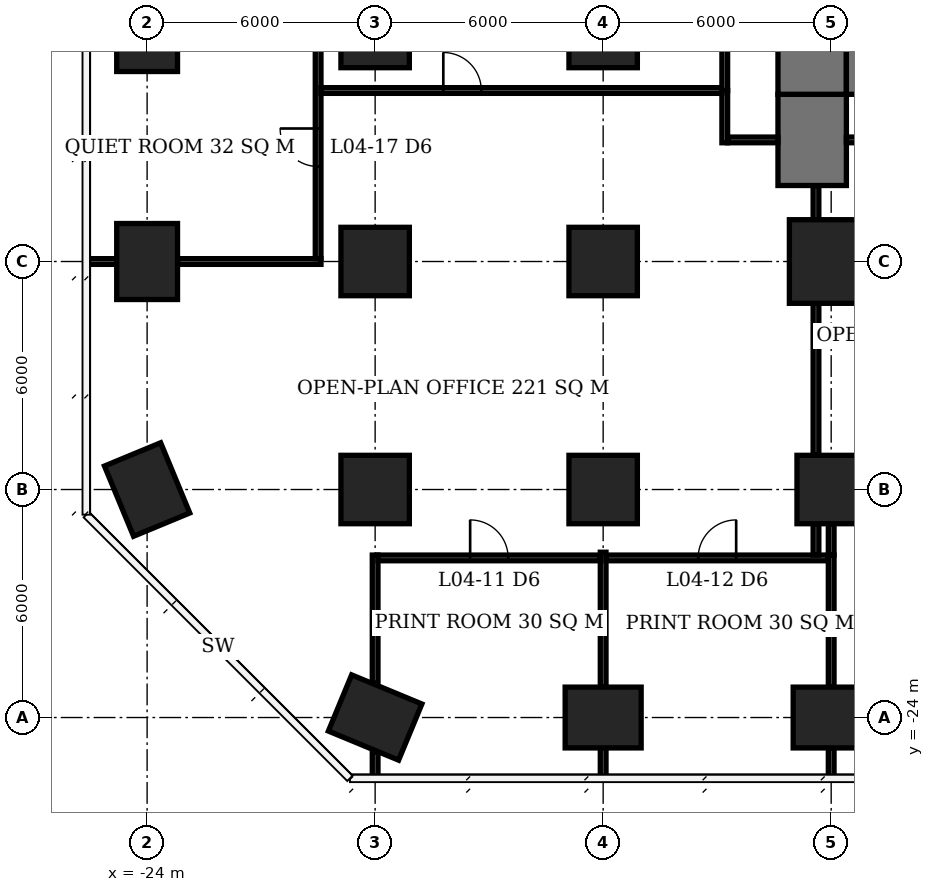
"""IFC4 building model, lengths in metres.
Left out: names, types, materials, properties, quantities, classifications, styles, units other than length and angle.
Written with IfcOpenShell. Run it as: python <this file> out.ifc"""

import sys

from ifc_helpers import new_model, si_unit, direction, frame, frame_2d, origin, origin_2d, place, context, subcontext, project, spatial, rectangle, extrude, element, fill, save


model = new_model("IFC4")
c1 = context("Model", 3, precision=1e-05, world=origin(), true_north=direction((0.0, 1.0)))
c2 = subcontext(c1, "Body", "Model", "MODEL_VIEW")
j1 = project(units=[si_unit("LENGTHUNIT", "METRE"), si_unit("PLANEANGLEUNIT", "RADIAN")], contexts=[c1])
p1 = place(None, origin())
s1 = spatial("IfcSite", under=j1, at=p1, CompositionType="ELEMENT")
p2 = place(p1, origin())
s2 = spatial("IfcBuilding", under=s1, at=p2, CompositionType="ELEMENT")
p3 = place(p2, frame((0.0, 0.0, 22.1)))
s3 = spatial("IfcBuildingStorey", under=s2, at=p3, CompositionType="ELEMENT", Elevation=22.1)
for number, where, z_axis, x_axis in (
    (1, (-24.0, -18.0, 0.0), (0.0, 0.0, 1.0), (-0.383, 0.924, 0.0)),
    (2, (-24.0, -12.0, 0.0), (0.0, 0.0, 1.0), (0.0, 1.0, 0.0)),
    (3, (-24.0, -6.0, 0.0), (0.0, 0.0, 1.0), (0.0, 1.0, 0.0)),
    (4, (-18.0, -24.0, 0.0), (0.0, 0.0, 1.0), (-0.924, 0.383, 0.0)),
):
    element("IfcColumn", number, at=place(p3, frame(where, z_axis=z_axis, x_axis=x_axis)), inside=s3, PredefinedType="COLUMN", context=c2, shape_type="SweptSolid", body=[
        extrude(rectangle(XDim=2.0, YDim=1.6, at=origin_2d()), origin(), (0.0, 0.0, 1.0), 3.9),
    ])
p4 = place(p3, frame((-18.0, -18.0, -0.55), z_axis=(0.0, 0.0, 1.0), x_axis=(1.0, 0.0, 0.0)))
e5 = element("IfcColumn", 5, at=p4, inside=s3, PredefinedType="COLUMN", context=c2, shape_type="SweptSolid", body=[
    extrude(rectangle(XDim=1.8, YDim=1.8, at=origin_2d()), origin(), (0.0, 0.0, 1.0), 4.45),
])
for number, where, z_axis, x_axis in (
    (6, (-18.0, -12.0, 0.0), (0.0, 0.0, 1.0), (1.0, 0.0, 0.0)),
    (7, (-18.0, -6.0, 0.0), (0.0, 0.0, 1.0), (1.0, 0.0, 0.0)),
):
    element("IfcColumn", number, at=place(p3, frame(where, z_axis=z_axis, x_axis=x_axis)), inside=s3, PredefinedType="COLUMN", context=c2, shape_type="SweptSolid", body=[
        extrude(rectangle(XDim=1.8, YDim=1.8, at=origin_2d()), origin(), (0.0, 0.0, 1.0), 3.9),
    ])
p5 = place(p3, frame((-12.0, -24.0, 0.0), z_axis=(0.0, 0.0, 1.0), x_axis=(1.0, 0.0, 0.0)))
e8 = element("IfcColumn", 8, at=p5, inside=s3, PredefinedType="COLUMN", context=c2, shape_type="SweptSolid", body=[
    extrude(rectangle(XDim=2.0, YDim=1.6, at=origin_2d()), origin(), (0.0, 0.0, 1.0), 3.9),
])
p6 = place(p3, frame((-12.0, -18.0, -0.55), z_axis=(0.0, 0.0, 1.0), x_axis=(1.0, 0.0, 0.0)))
e9 = element("IfcColumn", 9, at=p6, inside=s3, PredefinedType="COLUMN", context=c2, shape_type="SweptSolid", body=[
    extrude(rectangle(XDim=1.8, YDim=1.8, at=origin_2d()), origin(), (0.0, 0.0, 1.0), 4.45),
])
for number, where, z_axis, x_axis in (
    (10, (-12.0, -12.0, 0.0), (0.0, 0.0, 1.0), (1.0, 0.0, 0.0)),
    (11, (-12.0, -6.0, 0.0), (0.0, 0.0, 1.0), (1.0, 0.0, 0.0)),
):
    element("IfcColumn", number, at=place(p3, frame(where, z_axis=z_axis, x_axis=x_axis)), inside=s3, PredefinedType="COLUMN", context=c2, shape_type="SweptSolid", body=[
        extrude(rectangle(XDim=1.8, YDim=1.8, at=origin_2d()), origin(), (0.0, 0.0, 1.0), 3.9),
    ])
p7 = place(p3, frame((-6.0, -24.0, 0.0), z_axis=(0.0, 0.0, 1.0), x_axis=(1.0, 0.0, 0.0)))
e12 = element("IfcColumn", 12, at=p7, inside=s3, PredefinedType="COLUMN", context=c2, shape_type="SweptSolid", body=[
    extrude(rectangle(XDim=2.0, YDim=1.6, at=origin_2d()), origin(), (0.0, 0.0, 1.0), 3.9),
])
p8 = place(p3, frame((-6.0, -18.0, -0.55), z_axis=(0.0, 0.0, 1.0), x_axis=(1.0, 0.0, 0.0)))
e13 = element("IfcColumn", 13, at=p8, inside=s3, PredefinedType="COLUMN", context=c2, shape_type="SweptSolid", body=[
    extrude(rectangle(XDim=1.8, YDim=1.8, at=origin_2d()), origin(), (0.0, 0.0, 1.0), 4.45),
])
p9 = place(p3, frame((-6.0, -12.0, 0.0), z_axis=(0.0, 0.0, 1.0), x_axis=(1.0, 0.0, 0.0)))
e14 = element("IfcColumn", 14, at=p9, inside=s3, PredefinedType="COLUMN", context=c2, shape_type="SweptSolid", body=[
    extrude(rectangle(XDim=2.2, YDim=2.2, at=origin_2d()), origin(), (0.0, 0.0, 1.0), 3.9),
])
p10 = place(p3, frame((-5.6, -6.6, 0.0), z_axis=(0.0, 0.0, 1.0), x_axis=(1.0, 0.0, 0.0)))
e15 = element("IfcWall", 15, at=p10, inside=s3, PredefinedType="SHEAR", context=c2, shape_type="SweptSolid", body=[
    extrude(rectangle(XDim=23.2, YDim=2.0, at=frame_2d((11.6, 0.0))), origin(), (0.0, 0.0, 1.0), 3.9),
])
p11 = place(p3, frame((-6.5, -7.6, 0.0), z_axis=(0.0, 0.0, 1.0), x_axis=(0.0, 1.0, 0.0)))
e16 = element("IfcWall", 16, at=p11, inside=s3, PredefinedType="SHEAR", context=c2, shape_type="SweptSolid", body=[
    extrude(rectangle(XDim=21.2, YDim=1.8, at=frame_2d((10.6, 0.0))), origin(), (0.0, 0.0, 1.0), 3.9),
])
p12 = place(p11, frame((7.8, 0.0, 0.0)))
e17 = element("IfcOpeningElement", 17, at=p12, cuts=e16, PredefinedType="OPENING", context=c2, shape_type="SweptSolid", body=[
    extrude(rectangle(XDim=1.8, YDim=2.4, at=frame_2d((0.9, 1.2))), frame((0.0, 0.91, 0.0), z_axis=(0.0, -1.0, 0.0), x_axis=(1.0, 0.0, 0.0)), (0.0, 0.0, 1.0), 1.82),
])
p13 = place(p3, frame((-6.5, -10.0, 0.0), z_axis=(0.0, 0.0, 1.0), x_axis=(0.0, 1.0, 0.0)))
e18 = element("IfcWall", 18, at=p13, inside=s3, PredefinedType="SHEAR", context=c2, shape_type="SweptSolid", body=[
    extrude(rectangle(XDim=2.4, YDim=1.8, at=frame_2d((1.2, 0.0))), origin(), (0.0, 0.0, 1.0), 3.9),
])
p14 = place(p3, frame((-17.925, -19.8, 0.0), z_axis=(0.0, 0.0, 1.0), x_axis=(1.0, 0.0, 0.0)))
e19 = element("IfcWall", 19, at=p14, inside=s3, PredefinedType="PARTITIONING", context=c2, shape_type="SweptSolid", body=[
    extrude(rectangle(XDim=5.85, YDim=0.15, at=frame_2d((2.925, 0.0))), origin(), (0.0, 0.0, 1.0), 3.65),
])
p15 = place(p14, frame((2.425, 0.0, 0.0)))
e20 = element("IfcOpeningElement", 20, at=p15, cuts=e19, PredefinedType="OPENING", context=c2, shape_type="SweptSolid", body=[
    extrude(rectangle(XDim=1.0, YDim=2.1, at=frame_2d((0.5, 1.05))), frame((0.0, 0.085, 0.0), z_axis=(0.0, -1.0, 0.0), x_axis=(1.0, 0.0, 0.0)), (0.0, 0.0, 1.0), 0.17),
])
p16 = place(p3, frame((-11.925, -19.8, 0.0), z_axis=(0.0, 0.0, 1.0), x_axis=(1.0, 0.0, 0.0)))
e21 = element("IfcWall", 21, at=p16, inside=s3, PredefinedType="PARTITIONING", context=c2, shape_type="SweptSolid", body=[
    extrude(rectangle(XDim=5.85, YDim=0.15, at=frame_2d((2.925, 0.0))), origin(), (0.0, 0.0, 1.0), 3.65),
])
p17 = place(p16, frame((2.425, 0.0, 0.0)))
e22 = element("IfcOpeningElement", 22, at=p17, cuts=e21, PredefinedType="OPENING", context=c2, shape_type="SweptSolid", body=[
    extrude(rectangle(XDim=1.0, YDim=2.1, at=frame_2d((0.5, 1.05))), frame((0.0, 0.085, 0.0), z_axis=(0.0, -1.0, 0.0), x_axis=(1.0, 0.0, 0.0)), (0.0, 0.0, 1.0), 0.17),
])
p18 = place(p3, frame((-25.6, -12.0, 0.0), z_axis=(0.0, 0.0, 1.0), x_axis=(1.0, 0.0, 0.0)))
e23 = element("IfcWall", 23, at=p18, inside=s3, PredefinedType="PARTITIONING", context=c2, shape_type="SweptSolid", body=[
    extrude(rectangle(XDim=0.8, YDim=0.15, at=frame_2d((0.4, 0.0))), origin(), (0.0, 0.0, 1.0), 3.65),
])
p19 = place(p3, frame((-23.2, -12.0, 0.0), z_axis=(0.0, 0.0, 1.0), x_axis=(1.0, 0.0, 0.0)))
e24 = element("IfcWall", 24, at=p19, inside=s3, PredefinedType="PARTITIONING", context=c2, shape_type="SweptSolid", body=[
    extrude(rectangle(XDim=3.775, YDim=0.15, at=frame_2d((1.887, 0.0))), origin(), (0.0, 0.0, 1.0), 3.65),
])
p20 = place(p3, frame((-19.5, -11.925, 0.0), z_axis=(0.0, 0.0, 1.0), x_axis=(0.0, 1.0, 0.0)))
e25 = element("IfcWall", 25, at=p20, inside=s3, PredefinedType="PARTITIONING", context=c2, shape_type="SweptSolid", body=[
    extrude(rectangle(XDim=5.85, YDim=0.15, at=frame_2d((2.925, 0.0))), origin(), (0.0, 0.0, 1.0), 3.65),
])
p21 = place(p20, frame((2.425, 0.0, 0.0)))
e26 = element("IfcOpeningElement", 26, at=p21, cuts=e25, PredefinedType="OPENING", context=c2, shape_type="SweptSolid", body=[
    extrude(rectangle(XDim=1.0, YDim=2.1, at=frame_2d((0.5, 1.05))), frame((0.0, 0.085, 0.0), z_axis=(0.0, -1.0, 0.0), x_axis=(1.0, 0.0, 0.0)), (0.0, 0.0, 1.0), 0.17),
])
p22 = place(p3, frame((-18.0, -25.6, 0.0), z_axis=(0.0, 0.0, 1.0), x_axis=(0.0, 1.0, 0.0)))
e27 = element("IfcWall", 27, at=p22, inside=s3, PredefinedType="PARTITIONING", context=c2, shape_type="SweptSolid", body=[
    extrude(rectangle(XDim=0.703, YDim=0.15, at=frame_2d((0.352, 0.0))), origin(), (0.0, 0.0, 1.0), 3.65),
])
p23 = place(p3, frame((-18.0, -23.103, 0.0), z_axis=(0.0, 0.0, 1.0), x_axis=(0.0, 1.0, 0.0)))
e28 = element("IfcWall", 28, at=p23, inside=s3, PredefinedType="PARTITIONING", context=c2, shape_type="SweptSolid", body=[
    extrude(rectangle(XDim=3.378, YDim=0.15, at=frame_2d((1.689, 0.0))), origin(), (0.0, 0.0, 1.0), 3.65),
])
p24 = place(p3, frame((-12.0, -25.6, 0.0), z_axis=(0.0, 0.0, 1.0), x_axis=(0.0, 1.0, 0.0)))
e29 = element("IfcWall", 29, at=p24, inside=s3, PredefinedType="PARTITIONING", context=c2, shape_type="SweptSolid", body=[
    extrude(rectangle(XDim=0.8, YDim=0.15, at=frame_2d((0.4, 0.0))), origin(), (0.0, 0.0, 1.0), 3.65),
])
p25 = place(p3, frame((-12.0, -23.2, 0.0), z_axis=(0.0, 0.0, 1.0), x_axis=(0.0, 1.0, 0.0)))
e30 = element("IfcWall", 30, at=p25, inside=s3, PredefinedType="PARTITIONING", context=c2, shape_type="SweptSolid", body=[
    extrude(rectangle(XDim=3.55, YDim=0.15, at=frame_2d((1.775, 0.0))), origin(), (0.0, 0.0, 1.0), 3.65),
])
p26 = place(p3, frame((-6.0, -25.6, 0.0), z_axis=(0.0, 0.0, 1.0), x_axis=(0.0, 1.0, 0.0)))
e31 = element("IfcWall", 31, at=p26, inside=s3, PredefinedType="PARTITIONING", context=c2, shape_type="SweptSolid", body=[
    extrude(rectangle(XDim=0.8, YDim=0.15, at=frame_2d((0.4, 0.0))), origin(), (0.0, 0.0, 1.0), 3.65),
])
p27 = place(p3, frame((-6.0, -23.2, 0.0), z_axis=(0.0, 0.0, 1.0), x_axis=(0.0, 1.0, 0.0)))
e32 = element("IfcWall", 32, at=p27, inside=s3, PredefinedType="PARTITIONING", context=c2, shape_type="SweptSolid", body=[
    extrude(rectangle(XDim=3.475, YDim=0.15, at=frame_2d((1.737, 0.0))), origin(), (0.0, 0.0, 1.0), 3.65),
])
p28 = place(p3, frame((-6.0, -19.725, 0.0), z_axis=(0.0, 0.0, 1.0), x_axis=(0.0, 1.0, 0.0)))
e33 = element("IfcWall", 33, at=p28, inside=s3, PredefinedType="PARTITIONING", context=c2, shape_type="SweptSolid", body=[
    extrude(rectangle(XDim=0.825, YDim=0.15, at=frame_2d((0.413, 0.0))), origin(), (0.0, 0.0, 1.0), 3.65),
])
p29 = place(p3, frame((-19.425, -7.5, 0.0), z_axis=(0.0, 0.0, 1.0), x_axis=(1.0, 0.0, 0.0)))
e34 = element("IfcWall", 34, at=p29, inside=s3, PredefinedType="PARTITIONING", context=c2, shape_type="SweptSolid", body=[
    extrude(rectangle(XDim=10.55, YDim=0.15, at=frame_2d((5.275, 0.0))), origin(), (0.0, 0.0, 1.0), 3.65),
])
p30 = place(p29, frame((3.219, 0.0, 0.0)))
e35 = element("IfcOpeningElement", 35, at=p30, cuts=e34, PredefinedType="OPENING", context=c2, shape_type="SweptSolid", body=[
    extrude(rectangle(XDim=1.0, YDim=2.1, at=frame_2d((0.5, 1.05))), frame((0.0, 0.085, 0.0), z_axis=(0.0, -1.0, 0.0), x_axis=(1.0, 0.0, 0.0)), (0.0, 0.0, 1.0), 0.17),
])
p31 = place(p3, frame((-8.8, -8.875, 0.0), z_axis=(0.0, 0.0, 1.0), x_axis=(0.0, 1.0, 0.0)))
e36 = element("IfcWall", 36, at=p31, inside=s3, PredefinedType="PARTITIONING", context=c2, shape_type="SweptSolid", body=[
    extrude(rectangle(XDim=1.375, YDim=0.15, at=frame_2d((0.688, 0.0))), origin(), (0.0, 0.0, 1.0), 3.65),
])
p32 = place(p3, frame((-8.725, -8.8, 0.0), z_axis=(0.0, 0.0, 1.0), x_axis=(1.0, 0.0, 0.0)))
e37 = element("IfcWall", 37, at=p32, inside=s3, PredefinedType="PARTITIONING", context=c2, shape_type="SweptSolid", body=[
    extrude(rectangle(XDim=1.325, YDim=0.15, at=frame_2d((0.663, 0.0))), origin(), (0.0, 0.0, 1.0), 3.65),
])
p33 = place(p3, frame((-8.8, -7.5, 0.0), z_axis=(0.0, 0.0, 1.0), x_axis=(0.0, 1.0, 0.0)))
e38 = element("IfcWall", 38, at=p33, inside=s3, PredefinedType="PARTITIONING", context=c2, shape_type="SweptSolid", body=[
    extrude(rectangle(XDim=11.925, YDim=0.15, at=frame_2d((5.962, 0.0))), origin(), (0.0, 0.0, 1.0), 3.65),
])
p34 = place(p33, frame((3.7, 0.0, 0.0)))
e39 = element("IfcOpeningElement", 39, at=p34, cuts=e38, PredefinedType="OPENING", context=c2, shape_type="SweptSolid", body=[
    extrude(rectangle(XDim=1.0, YDim=2.1, at=frame_2d((0.5, 1.05))), frame((0.0, 0.085, 0.0), z_axis=(0.0, -1.0, 0.0), x_axis=(1.0, 0.0, 0.0)), (0.0, 0.0, 1.0), 0.17),
])
p35 = place(p3, frame((-6.4, -19.725, 0.0), z_axis=(0.0, 0.0, 1.0), x_axis=(0.0, 1.0, 0.0)))
e40 = element("IfcWall", 40, at=p35, inside=s3, PredefinedType="PARTITIONING", context=c2, shape_type="SweptSolid", body=[
    extrude(rectangle(XDim=0.825, YDim=0.15, at=frame_2d((0.413, 0.0))), origin(), (0.0, 0.0, 1.0), 3.65),
])
p36 = place(p3, frame((-6.4, -17.1, 0.0), z_axis=(0.0, 0.0, 1.0), x_axis=(0.0, 1.0, 0.0)))
e41 = element("IfcWall", 41, at=p36, inside=s3, PredefinedType="PARTITIONING", context=c2, shape_type="SweptSolid", body=[
    extrude(rectangle(XDim=4.0, YDim=0.15, at=frame_2d((2.0, 0.0))), origin(), (0.0, 0.0, 1.0), 3.65),
])
p37 = place(p3, frame((-6.4, -10.9, 0.0), z_axis=(0.0, 0.0, 1.0), x_axis=(0.0, 1.0, 0.0)))
e42 = element("IfcWall", 42, at=p37, inside=s3, PredefinedType="PARTITIONING", context=c2, shape_type="SweptSolid", body=[
    extrude(rectangle(XDim=0.9, YDim=0.15, at=frame_2d((0.45, 0.0))), origin(), (0.0, 0.0, 1.0), 3.65),
])
p38 = place(p3, frame((-5.6, -8.8, 0.0), z_axis=(0.0, 0.0, 1.0), x_axis=(1.0, 0.0, 0.0)))
e43 = element("IfcWall", 43, at=p38, inside=s3, PredefinedType="PARTITIONING", context=c2, shape_type="SweptSolid", body=[
    extrude(rectangle(XDim=7.025, YDim=0.15, at=frame_2d((3.513, 0.0))), origin(), (0.0, 0.0, 1.0), 3.65),
])
p39 = place(p38, frame((1.985, 0.0, 0.0)))
e44 = element("IfcOpeningElement", 44, at=p39, cuts=e43, PredefinedType="OPENING", context=c2, shape_type="SweptSolid", body=[
    extrude(rectangle(XDim=1.0, YDim=2.1, at=frame_2d((0.5, 1.05))), frame((0.0, 0.085, 0.0), z_axis=(0.0, -1.0, 0.0), x_axis=(1.0, 0.0, 0.0)), (0.0, 0.0, 1.0), 0.17),
])
p40 = place(p15, origin())
e45 = element("IfcDoor", 45, at=p40, inside=s3, OperationType="SINGLE_SWING_LEFT", PredefinedType="DOOR", context=c2, shape_type="SweptSolid", body=[
    extrude(rectangle(XDim=1.0, YDim=2.1, at=frame_2d((0.5, 1.05))), frame((0.0, 0.025, 0.0), z_axis=(0.0, -1.0, 0.0), x_axis=(1.0, 0.0, 0.0)), (0.0, 0.0, 1.0), 0.05),
])
fill(e20, e45)
p41 = place(p17, origin())
e46 = element("IfcDoor", 46, at=p41, inside=s3, OperationType="SINGLE_SWING_RIGHT", PredefinedType="DOOR", context=c2, shape_type="SweptSolid", body=[
    extrude(rectangle(XDim=1.0, YDim=2.1, at=frame_2d((0.5, 1.05))), frame((0.0, 0.025, 0.0), z_axis=(0.0, -1.0, 0.0), x_axis=(1.0, 0.0, 0.0)), (0.0, 0.0, 1.0), 0.05),
])
fill(e22, e46)
p42 = place(p21, origin())
e47 = element("IfcDoor", 47, at=p42, inside=s3, OperationType="SINGLE_SWING_RIGHT", PredefinedType="DOOR", context=c2, shape_type="SweptSolid", body=[
    extrude(rectangle(XDim=1.0, YDim=2.1, at=frame_2d((0.5, 1.05))), frame((0.0, 0.025, 0.0), z_axis=(0.0, -1.0, 0.0), x_axis=(1.0, 0.0, 0.0)), (0.0, 0.0, 1.0), 0.05),
])
fill(e26, e47)
p43 = place(p30, origin())
e48 = element("IfcDoor", 48, at=p43, inside=s3, OperationType="SINGLE_SWING_LEFT", PredefinedType="DOOR", context=c2, shape_type="SweptSolid", body=[
    extrude(rectangle(XDim=1.0, YDim=2.1, at=frame_2d((0.5, 1.05))), frame((0.0, 0.025, 0.0), z_axis=(0.0, -1.0, 0.0), x_axis=(1.0, 0.0, 0.0)), (0.0, 0.0, 1.0), 0.05),
])
fill(e35, e48)
save(model, sys.argv[1])
